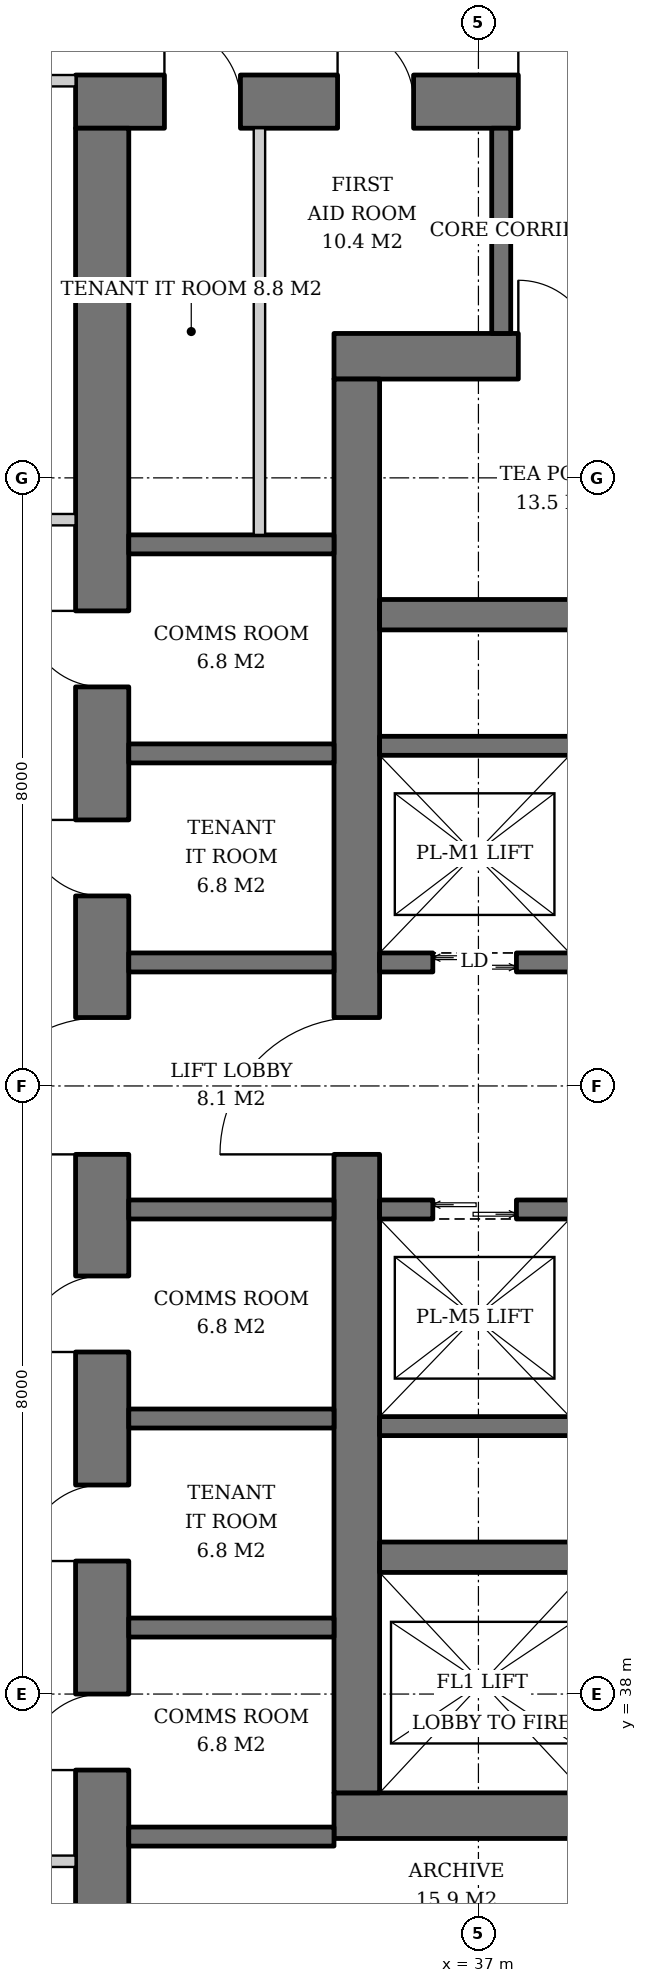
"""IFC4 building model, lengths in metres.
Left out: names, types, materials, properties, quantities, classifications, styles, units other than length and angle.
Written with IfcOpenShell. Run it as: python <this file> out.ifc"""

import sys

from ifc_helpers import new_model, si_unit, direction, frame, frame_2d, origin, place, context, subcontext, project, spatial, rectangle, extrude, element, fill, save


model = new_model("IFC4")
c1 = context("Model", 3, precision=1e-05, world=origin(), true_north=direction((0.0, 1.0)))
c2 = subcontext(c1, "Body", "Model", "MODEL_VIEW")
j1 = project(units=[si_unit("LENGTHUNIT", "METRE"), si_unit("PLANEANGLEUNIT", "RADIAN")], contexts=[c1])
p1 = place(None, origin())
s1 = spatial("IfcSite", under=j1, at=p1, CompositionType="ELEMENT")
p2 = place(p1, origin())
s2 = spatial("IfcBuilding", under=s1, at=p2, CompositionType="ELEMENT")
p3 = place(p2, frame((0.0, 0.0, 100.8)))
s3 = spatial("IfcBuildingStorey", under=s2, at=p3, CompositionType="ELEMENT", Elevation=100.8)
p4 = place(p3, frame((35.1, 36.4, 0.0), z_axis=(0.0, 0.0, 1.0), x_axis=(1.0, 0.0, 0.0)))
e1 = element("IfcWall", 1, at=p4, inside=s3, PredefinedType="SHEAR", context=c2, shape_type="SweptSolid", body=[
    extrude(rectangle(XDim=19.8, YDim=0.6, at=frame_2d((9.9, 0.0))), origin(), (0.0, 0.0, 1.0), 3.8),
])
p5 = place(p4, frame((3.9, 0.0, 0.0)))
e2 = element("IfcOpeningElement", 2, at=p5, cuts=e1, PredefinedType="OPENING", context=c2, shape_type="SweptSolid", body=[
    extrude(rectangle(XDim=1.0, YDim=2.1, at=frame_2d((0.5, 1.05))), frame((0.0, 0.31, 0.0), z_axis=(0.0, -1.0, 0.0), x_axis=(1.0, 0.0, 0.0)), (0.0, 0.0, 1.0), 0.62),
])
p6 = place(p4, frame((15.35, 0.0, 0.0)))
e3 = element("IfcOpeningElement", 3, at=p6, cuts=e1, PredefinedType="OPENING", context=c2, shape_type="SweptSolid", body=[
    extrude(rectangle(XDim=1.0, YDim=2.1, at=frame_2d((0.5, 1.05))), frame((0.0, 0.31, 0.0), z_axis=(0.0, -1.0, 0.0), x_axis=(1.0, 0.0, 0.0)), (0.0, 0.0, 1.0), 0.62),
])
p7 = place(p3, frame((35.1, 55.6, 0.0), z_axis=(0.0, 0.0, 1.0), x_axis=(1.0, 0.0, 0.0)))
e4 = element("IfcWall", 4, at=p7, inside=s3, PredefinedType="SHEAR", context=c2, shape_type="SweptSolid", body=[
    extrude(rectangle(XDim=19.8, YDim=0.6, at=frame_2d((9.9, 0.0))), origin(), (0.0, 0.0, 1.0), 3.8),
])
p8 = place(p7, frame((14.54, 0.0, 0.0)))
e5 = element("IfcOpeningElement", 5, at=p8, cuts=e4, PredefinedType="OPENING", context=c2, shape_type="SweptSolid", body=[
    extrude(rectangle(XDim=1.0, YDim=2.1, at=frame_2d((0.5, 1.05))), frame((0.0, 0.31, 0.0), z_axis=(0.0, -1.0, 0.0), x_axis=(1.0, 0.0, 0.0)), (0.0, 0.0, 1.0), 0.62),
])
p9 = place(p7, frame((2.425, 0.0, 0.0)))
e6 = element("IfcOpeningElement", 6, at=p9, cuts=e4, PredefinedType="OPENING", context=c2, shape_type="SweptSolid", body=[
    extrude(rectangle(XDim=1.0, YDim=2.1, at=frame_2d((0.5, 1.05))), frame((0.0, 0.31, 0.0), z_axis=(0.0, -1.0, 0.0), x_axis=(1.0, 0.0, 0.0)), (0.0, 0.0, 1.0), 0.62),
])
p10 = place(p3, frame((35.4, 36.7, 0.0), z_axis=(0.0, 0.0, 1.0), x_axis=(0.0, 1.0, 0.0)))
e7 = element("IfcWall", 7, at=p10, inside=s3, PredefinedType="SHEAR", context=c2, shape_type="SweptSolid", body=[
    extrude(rectangle(XDim=18.6, YDim=0.6, at=frame_2d((9.3, 0.0))), origin(), (0.0, 0.0, 1.0), 3.8),
])
p11 = place(p10, frame((8.4, 0.0, 0.0)))
e8 = element("IfcOpeningElement", 8, at=p11, cuts=e7, PredefinedType="OPENING", context=c2, shape_type="SweptSolid", body=[
    extrude(rectangle(XDim=1.8, YDim=2.4, at=frame_2d((0.9, 1.2))), frame((0.0, 0.31, 0.0), z_axis=(0.0, -1.0, 0.0), x_axis=(1.0, 0.0, 0.0)), (0.0, 0.0, 1.0), 0.62),
])
p12 = place(p3, frame((31.7, 58.95, 0.0), z_axis=(0.0, 0.0, 1.0), x_axis=(1.0, 0.0, 0.0)))
e9 = element("IfcWall", 9, at=p12, inside=s3, PredefinedType="SHEAR", context=c2, shape_type="SweptSolid", body=[
    extrude(rectangle(XDim=26.6, YDim=0.7, at=frame_2d((13.3, 0.0))), origin(), (0.0, 0.0, 1.0), 3.8),
])
p13 = place(p12, frame((17.94, 0.0, 0.0)))
e10 = element("IfcOpeningElement", 10, at=p13, cuts=e9, PredefinedType="OPENING", context=c2, shape_type="SweptSolid", body=[
    extrude(rectangle(XDim=1.0, YDim=2.1, at=frame_2d((0.5, 1.05))), frame((0.0, 0.36, 0.0), z_axis=(0.0, -1.0, 0.0), x_axis=(1.0, 0.0, 0.0)), (0.0, 0.0, 1.0), 0.72),
])
p14 = place(p12, frame((5.825, 0.0, 0.0)))
e11 = element("IfcOpeningElement", 11, at=p14, cuts=e9, PredefinedType="OPENING", context=c2, shape_type="SweptSolid", body=[
    extrude(rectangle(XDim=1.0, YDim=2.1, at=frame_2d((0.5, 1.05))), frame((0.0, 0.36, 0.0), z_axis=(0.0, -1.0, 0.0), x_axis=(1.0, 0.0, 0.0)), (0.0, 0.0, 1.0), 0.72),
])
p15 = place(p12, frame((1.169, 0.0, 0.0)))
e12 = element("IfcOpeningElement", 12, at=p15, cuts=e9, PredefinedType="OPENING", context=c2, shape_type="SweptSolid", body=[
    extrude(rectangle(XDim=1.0, YDim=2.1, at=frame_2d((0.5, 1.05))), frame((0.0, 0.36, 0.0), z_axis=(0.0, -1.0, 0.0), x_axis=(1.0, 0.0, 0.0)), (0.0, 0.0, 1.0), 0.72),
])
p16 = place(p12, frame((3.447, 0.0, 0.0)))
e13 = element("IfcOpeningElement", 13, at=p16, cuts=e9, PredefinedType="OPENING", context=c2, shape_type="SweptSolid", body=[
    extrude(rectangle(XDim=1.0, YDim=2.1, at=frame_2d((0.5, 1.05))), frame((0.0, 0.36, 0.0), z_axis=(0.0, -1.0, 0.0), x_axis=(1.0, 0.0, 0.0)), (0.0, 0.0, 1.0), 0.72),
])
p17 = place(p12, frame((11.577, 0.0, 0.0)))
e14 = element("IfcOpeningElement", 14, at=p17, cuts=e9, PredefinedType="OPENING", context=c2, shape_type="SweptSolid", body=[
    extrude(rectangle(XDim=1.0, YDim=2.1, at=frame_2d((0.5, 1.05))), frame((0.0, 0.36, 0.0), z_axis=(0.0, -1.0, 0.0), x_axis=(1.0, 0.0, 0.0)), (0.0, 0.0, 1.0), 0.72),
])
p18 = place(p12, frame((20.9, 0.0, 0.0)))
e15 = element("IfcOpeningElement", 15, at=p18, cuts=e9, PredefinedType="OPENING", context=c2, shape_type="SweptSolid", body=[
    extrude(rectangle(XDim=1.0, YDim=2.1, at=frame_2d((0.5, 1.05))), frame((0.0, 0.36, 0.0), z_axis=(0.0, -1.0, 0.0), x_axis=(1.0, 0.0, 0.0)), (0.0, 0.0, 1.0), 0.72),
])
p19 = place(p12, frame((23.75, 0.0, 0.0)))
e16 = element("IfcOpeningElement", 16, at=p19, cuts=e9, PredefinedType="OPENING", context=c2, shape_type="SweptSolid", body=[
    extrude(rectangle(XDim=1.0, YDim=2.1, at=frame_2d((0.5, 1.05))), frame((0.0, 0.36, 0.0), z_axis=(0.0, -1.0, 0.0), x_axis=(1.0, 0.0, 0.0)), (0.0, 0.0, 1.0), 0.72),
])
p20 = place(p3, frame((32.05, 33.4, 0.0), z_axis=(0.0, 0.0, 1.0), x_axis=(0.0, 1.0, 0.0)))
e17 = element("IfcWall", 17, at=p20, inside=s3, PredefinedType="SHEAR", context=c2, shape_type="SweptSolid", body=[
    extrude(rectangle(XDim=25.2, YDim=0.7, at=frame_2d((12.6, 0.0))), origin(), (0.0, 0.0, 1.0), 3.8),
])
p21 = place(p20, frame((11.7, 0.0, 0.0)))
e18 = element("IfcOpeningElement", 18, at=p21, cuts=e17, PredefinedType="OPENING", context=c2, shape_type="SweptSolid", body=[
    extrude(rectangle(XDim=1.8, YDim=2.4, at=frame_2d((0.9, 1.2))), frame((0.0, 0.36, 0.0), z_axis=(0.0, -1.0, 0.0), x_axis=(1.0, 0.0, 0.0)), (0.0, 0.0, 1.0), 0.72),
])
p22 = place(p20, frame((3.6, 0.0, 0.0)))
e19 = element("IfcOpeningElement", 19, at=p22, cuts=e17, PredefinedType="OPENING", context=c2, shape_type="SweptSolid", body=[
    extrude(rectangle(XDim=1.0, YDim=2.1, at=frame_2d((0.5, 1.05))), frame((0.0, 0.36, 0.0), z_axis=(0.0, -1.0, 0.0), x_axis=(1.0, 0.0, 0.0)), (0.0, 0.0, 1.0), 0.72),
])
p23 = place(p20, frame((6.35, 0.0, 0.0)))
e20 = element("IfcOpeningElement", 20, at=p23, cuts=e17, PredefinedType="OPENING", context=c2, shape_type="SweptSolid", body=[
    extrude(rectangle(XDim=1.0, YDim=2.1, at=frame_2d((0.5, 1.05))), frame((0.0, 0.36, 0.0), z_axis=(0.0, -1.0, 0.0), x_axis=(1.0, 0.0, 0.0)), (0.0, 0.0, 1.0), 0.72),
])
p24 = place(p20, frame((9.1, 0.0, 0.0)))
e21 = element("IfcOpeningElement", 21, at=p24, cuts=e17, PredefinedType="OPENING", context=c2, shape_type="SweptSolid", body=[
    extrude(rectangle(XDim=1.0, YDim=2.1, at=frame_2d((0.5, 1.05))), frame((0.0, 0.36, 0.0), z_axis=(0.0, -1.0, 0.0), x_axis=(1.0, 0.0, 0.0)), (0.0, 0.0, 1.0), 0.72),
])
p25 = place(p20, frame((15.1, 0.0, 0.0)))
e22 = element("IfcOpeningElement", 22, at=p25, cuts=e17, PredefinedType="OPENING", context=c2, shape_type="SweptSolid", body=[
    extrude(rectangle(XDim=1.0, YDim=2.1, at=frame_2d((0.5, 1.05))), frame((0.0, 0.36, 0.0), z_axis=(0.0, -1.0, 0.0), x_axis=(1.0, 0.0, 0.0)), (0.0, 0.0, 1.0), 0.72),
])
p26 = place(p20, frame((17.85, 0.0, 0.0)))
e23 = element("IfcOpeningElement", 23, at=p26, cuts=e17, PredefinedType="OPENING", context=c2, shape_type="SweptSolid", body=[
    extrude(rectangle(XDim=1.0, YDim=2.1, at=frame_2d((0.5, 1.05))), frame((0.0, 0.36, 0.0), z_axis=(0.0, -1.0, 0.0), x_axis=(1.0, 0.0, 0.0)), (0.0, 0.0, 1.0), 0.72),
])
for number, where, z_axis, x_axis in (
    (24, (35.7, 39.8, 0.0), (0.0, 0.0, 1.0), (1.0, 0.0, 0.0)),
    (25, (35.7, 52.2, 0.0), (0.0, 0.0, 1.0), (1.0, 0.0, 0.0)),
):
    element("IfcWall", number, at=place(p3, frame(where, z_axis=z_axis, x_axis=x_axis)), inside=s3, PredefinedType="SHEAR", context=c2, shape_type="SweptSolid", body=[
        extrude(rectangle(XDim=18.6, YDim=0.4, at=frame_2d((9.3, 0.0))), origin(), (0.0, 0.0, 1.0), 3.8),
    ])
p27 = place(p3, frame((35.7, 50.475, 0.0), z_axis=(0.0, 0.0, 1.0), x_axis=(1.0, 0.0, 0.0)))
e26 = element("IfcWall", 26, at=p27, inside=s3, PredefinedType="SHEAR", context=c2, shape_type="SweptSolid", body=[
    extrude(rectangle(XDim=11.0, YDim=0.25, at=frame_2d((5.5, 0.0))), origin(), (0.0, 0.0, 1.0), 3.8),
])
p28 = place(p3, frame((35.7, 47.625, 0.0), z_axis=(0.0, 0.0, 1.0), x_axis=(1.0, 0.0, 0.0)))
e27 = element("IfcWall", 27, at=p28, inside=s3, PredefinedType="SHEAR", context=c2, shape_type="SweptSolid", body=[
    extrude(rectangle(XDim=12.83, YDim=0.25, at=frame_2d((6.415, 0.0))), origin(), (0.0, 0.0, 1.0), 3.8),
])
p29 = place(p28, frame((0.7, 0.0, 0.0)))
e28 = element("IfcOpeningElement", 28, at=p29, cuts=e27, PredefinedType="OPENING", context=c2, shape_type="SweptSolid", body=[
    extrude(rectangle(XDim=1.1, YDim=2.2, at=frame_2d((0.55, 1.1))), frame((0.0, 0.135, 0.0), z_axis=(0.0, -1.0, 0.0), x_axis=(1.0, 0.0, 0.0)), (0.0, 0.0, 1.0), 0.27),
])
p30 = place(p28, frame((3.45, 0.0, 0.0)))
e29 = element("IfcOpeningElement", 29, at=p30, cuts=e27, PredefinedType="OPENING", context=c2, shape_type="SweptSolid", body=[
    extrude(rectangle(XDim=1.1, YDim=2.2, at=frame_2d((0.55, 1.1))), frame((0.0, 0.135, 0.0), z_axis=(0.0, -1.0, 0.0), x_axis=(1.0, 0.0, 0.0)), (0.0, 0.0, 1.0), 0.27),
])
p31 = place(p28, frame((6.2, 0.0, 0.0)))
e30 = element("IfcOpeningElement", 30, at=p31, cuts=e27, PredefinedType="OPENING", context=c2, shape_type="SweptSolid", body=[
    extrude(rectangle(XDim=1.1, YDim=2.2, at=frame_2d((0.55, 1.1))), frame((0.0, 0.135, 0.0), z_axis=(0.0, -1.0, 0.0), x_axis=(1.0, 0.0, 0.0)), (0.0, 0.0, 1.0), 0.27),
])
p32 = place(p28, frame((8.95, 0.0, 0.0)))
e31 = element("IfcOpeningElement", 31, at=p32, cuts=e27, PredefinedType="OPENING", context=c2, shape_type="SweptSolid", body=[
    extrude(rectangle(XDim=1.1, YDim=2.2, at=frame_2d((0.55, 1.1))), frame((0.0, 0.135, 0.0), z_axis=(0.0, -1.0, 0.0), x_axis=(1.0, 0.0, 0.0)), (0.0, 0.0, 1.0), 0.27),
])
p33 = place(p28, frame((11.515, 0.0, 0.0)))
e32 = element("IfcOpeningElement", 32, at=p33, cuts=e27, PredefinedType="OPENING", context=c2, shape_type="SweptSolid", body=[
    extrude(rectangle(XDim=0.8, YDim=2.0, at=frame_2d((0.4, 1.0))), frame((0.0, 0.135, 0.0), z_axis=(0.0, -1.0, 0.0), x_axis=(1.0, 0.0, 0.0)), (0.0, 0.0, 1.0), 0.27),
])
p34 = place(p3, frame((35.7, 41.525, 0.0), z_axis=(0.0, 0.0, 1.0), x_axis=(1.0, 0.0, 0.0)))
e33 = element("IfcWall", 33, at=p34, inside=s3, PredefinedType="SHEAR", context=c2, shape_type="SweptSolid", body=[
    extrude(rectangle(XDim=11.0, YDim=0.25, at=frame_2d((5.5, 0.0))), origin(), (0.0, 0.0, 1.0), 3.8),
])
p35 = place(p3, frame((35.7, 44.375, 0.0), z_axis=(0.0, 0.0, 1.0), x_axis=(1.0, 0.0, 0.0)))
e34 = element("IfcWall", 34, at=p35, inside=s3, PredefinedType="SHEAR", context=c2, shape_type="SweptSolid", body=[
    extrude(rectangle(XDim=12.83, YDim=0.25, at=frame_2d((6.415, 0.0))), origin(), (0.0, 0.0, 1.0), 3.8),
])
p36 = place(p35, frame((0.7, 0.0, 0.0)))
e35 = element("IfcOpeningElement", 35, at=p36, cuts=e34, PredefinedType="OPENING", context=c2, shape_type="SweptSolid", body=[
    extrude(rectangle(XDim=1.1, YDim=2.2, at=frame_2d((0.55, 1.1))), frame((0.0, 0.135, 0.0), z_axis=(0.0, -1.0, 0.0), x_axis=(1.0, 0.0, 0.0)), (0.0, 0.0, 1.0), 0.27),
])
p37 = place(p35, frame((3.45, 0.0, 0.0)))
e36 = element("IfcOpeningElement", 36, at=p37, cuts=e34, PredefinedType="OPENING", context=c2, shape_type="SweptSolid", body=[
    extrude(rectangle(XDim=1.1, YDim=2.2, at=frame_2d((0.55, 1.1))), frame((0.0, 0.135, 0.0), z_axis=(0.0, -1.0, 0.0), x_axis=(1.0, 0.0, 0.0)), (0.0, 0.0, 1.0), 0.27),
])
p38 = place(p35, frame((6.2, 0.0, 0.0)))
e37 = element("IfcOpeningElement", 37, at=p38, cuts=e34, PredefinedType="OPENING", context=c2, shape_type="SweptSolid", body=[
    extrude(rectangle(XDim=1.1, YDim=2.2, at=frame_2d((0.55, 1.1))), frame((0.0, 0.135, 0.0), z_axis=(0.0, -1.0, 0.0), x_axis=(1.0, 0.0, 0.0)), (0.0, 0.0, 1.0), 0.27),
])
p39 = place(p35, frame((8.95, 0.0, 0.0)))
e38 = element("IfcOpeningElement", 38, at=p39, cuts=e34, PredefinedType="OPENING", context=c2, shape_type="SweptSolid", body=[
    extrude(rectangle(XDim=1.1, YDim=2.2, at=frame_2d((0.55, 1.1))), frame((0.0, 0.135, 0.0), z_axis=(0.0, -1.0, 0.0), x_axis=(1.0, 0.0, 0.0)), (0.0, 0.0, 1.0), 0.27),
])
p40 = place(p35, frame((11.515, 0.0, 0.0)))
e39 = element("IfcOpeningElement", 39, at=p40, cuts=e34, PredefinedType="OPENING", context=c2, shape_type="SweptSolid", body=[
    extrude(rectangle(XDim=0.8, YDim=2.0, at=frame_2d((0.4, 1.0))), frame((0.0, 0.135, 0.0), z_axis=(0.0, -1.0, 0.0), x_axis=(1.0, 0.0, 0.0)), (0.0, 0.0, 1.0), 0.27),
])
for number, where, z_axis, x_axis in (
    (40, (32.4, 36.125, 0.0), (0.0, 0.0, 1.0), (1.0, 0.0, 0.0)),
    (41, (32.4, 38.875, 0.0), (0.0, 0.0, 1.0), (1.0, 0.0, 0.0)),
    (42, (32.4, 41.625, 0.0), (0.0, 0.0, 1.0), (1.0, 0.0, 0.0)),
    (43, (32.4, 44.375, 0.0), (0.0, 0.0, 1.0), (1.0, 0.0, 0.0)),
    (44, (32.4, 47.625, 0.0), (0.0, 0.0, 1.0), (1.0, 0.0, 0.0)),
    (45, (32.4, 50.375, 0.0), (0.0, 0.0, 1.0), (1.0, 0.0, 0.0)),
    (46, (32.4, 53.125, 0.0), (0.0, 0.0, 1.0), (1.0, 0.0, 0.0)),
):
    element("IfcWall", number, at=place(p3, frame(where, z_axis=z_axis, x_axis=x_axis)), inside=s3, PredefinedType="SHEAR", context=c2, shape_type="SweptSolid", body=[
        extrude(rectangle(XDim=2.7, YDim=0.25, at=frame_2d((1.35, 0.0))), origin(), (0.0, 0.0, 1.0), 3.8),
    ])
p41 = place(p3, frame((37.3, 55.9, 0.0), z_axis=(0.0, 0.0, 1.0), x_axis=(0.0, 1.0, 0.0)))
e47 = element("IfcWall", 47, at=p41, inside=s3, PredefinedType="SOLIDWALL", context=c2, shape_type="SweptSolid", body=[
    extrude(rectangle(XDim=2.7, YDim=0.25, at=frame_2d((1.35, 0.0))), origin(), (0.0, 0.0, 1.0), 3.62),
])
p42 = place(p3, frame((34.119, 53.25, 0.0), z_axis=(0.0, 0.0, 1.0), x_axis=(0.0, 1.0, 0.0)))
e48 = element("IfcWall", 48, at=p42, inside=s3, PredefinedType="SOLIDWALL", context=c2, shape_type="SweptSolid", body=[
    extrude(rectangle(XDim=5.35, YDim=0.15, at=frame_2d((2.675, 0.0))), origin(), (0.0, 0.0, 1.0), 3.62),
])
for number, where, z_axis, x_axis in (
    (49, (31.7, 59.225, 0.0), (0.0, 0.0, 1.0), (-1.0, 0.0, 0.0)),
    (50, (31.7, 53.45, 0.0), (0.0, 0.0, 1.0), (-1.0, 0.0, 0.0)),
    (51, (31.7, 35.8, 0.0), (0.0, 0.0, 1.0), (-1.0, 0.0, 0.0)),
):
    element("IfcWall", number, at=place(p3, frame(where, z_axis=z_axis, x_axis=x_axis)), inside=s3, PredefinedType="PARTITIONING", context=c2, shape_type="SweptSolid", body=[
        extrude(rectangle(XDim=2.925, YDim=0.15, at=frame_2d((1.462, 0.0))), origin(), (0.0, 0.0, 1.0), 3.62),
    ])
p43 = place(p29, origin())
e52 = element("IfcDoor", 52, at=p43, inside=s3, OperationType="DOUBLE_DOOR_SLIDING", PredefinedType="DOOR", context=c2, shape_type="SweptSolid", body=[
    extrude(rectangle(XDim=1.1, YDim=2.2, at=frame_2d((0.55, 1.1))), frame((0.0, 0.025, 0.0), z_axis=(0.0, -1.0, 0.0), x_axis=(1.0, 0.0, 0.0)), (0.0, 0.0, 1.0), 0.05),
])
fill(e28, e52)
p44 = place(p36, origin())
e53 = element("IfcDoor", 53, at=p44, inside=s3, OperationType="DOUBLE_DOOR_SLIDING", PredefinedType="DOOR", context=c2, shape_type="SweptSolid", body=[
    extrude(rectangle(XDim=1.1, YDim=2.2, at=frame_2d((0.55, 1.1))), frame((0.0, 0.025, 0.0), z_axis=(0.0, -1.0, 0.0), x_axis=(1.0, 0.0, 0.0)), (0.0, 0.0, 1.0), 0.05),
])
fill(e35, e53)
p45 = place(p11, origin())
e54 = element("IfcDoor", 54, at=p45, inside=s3, OperationType="DOUBLE_DOOR_SINGLE_SWING", PredefinedType="DOOR", context=c2, shape_type="SweptSolid", body=[
    extrude(rectangle(XDim=1.8, YDim=2.4, at=frame_2d((0.9, 1.2))), frame((0.0, 0.025, 0.0), z_axis=(0.0, -1.0, 0.0), x_axis=(1.0, 0.0, 0.0)), (0.0, 0.0, 1.0), 0.05),
])
fill(e8, e54)
p46 = place(p21, origin())
e55 = element("IfcDoor", 55, at=p46, inside=s3, OperationType="DOUBLE_DOOR_SINGLE_SWING", PredefinedType="DOOR", context=c2, shape_type="SweptSolid", body=[
    extrude(rectangle(XDim=1.8, YDim=2.4, at=frame_2d((0.9, 1.2))), frame((0.0, 0.025, 0.0), z_axis=(0.0, -1.0, 0.0), x_axis=(1.0, 0.0, 0.0)), (0.0, 0.0, 1.0), 0.05),
])
fill(e18, e55)
p47 = place(p14, origin())
e56 = element("IfcDoor", 56, at=p47, inside=s3, OperationType="SINGLE_SWING_LEFT", PredefinedType="DOOR", context=c2, shape_type="SweptSolid", body=[
    extrude(rectangle(XDim=1.0, YDim=2.1, at=frame_2d((0.5, 1.05))), frame((0.0, 0.025, 0.0), z_axis=(0.0, -1.0, 0.0), x_axis=(1.0, 0.0, 0.0)), (0.0, 0.0, 1.0), 0.05),
])
fill(e11, e56)
p48 = place(p9, origin())
e57 = element("IfcDoor", 57, at=p48, inside=s3, OperationType="SINGLE_SWING_LEFT", PredefinedType="DOOR", context=c2, shape_type="SweptSolid", body=[
    extrude(rectangle(XDim=1.0, YDim=2.1, at=frame_2d((0.5, 1.05))), frame((0.0, -0.24, 0.0), z_axis=(0.0, -1.0, 0.0), x_axis=(1.0, 0.0, 0.0)), (0.0, 0.0, 1.0), 0.05),
])
fill(e6, e57)
p49 = place(p22, origin())
e58 = element("IfcDoor", 58, at=p49, inside=s3, OperationType="SINGLE_SWING_LEFT", PredefinedType="DOOR", context=c2, shape_type="SweptSolid", body=[
    extrude(rectangle(XDim=1.0, YDim=2.1, at=frame_2d((0.5, 1.05))), frame((0.0, -0.29, 0.0), z_axis=(0.0, -1.0, 0.0), x_axis=(1.0, 0.0, 0.0)), (0.0, 0.0, 1.0), 0.05),
])
fill(e19, e58)
p50 = place(p23, origin())
e59 = element("IfcDoor", 59, at=p50, inside=s3, OperationType="SINGLE_SWING_LEFT", PredefinedType="DOOR", context=c2, shape_type="SweptSolid", body=[
    extrude(rectangle(XDim=1.0, YDim=2.1, at=frame_2d((0.5, 1.05))), frame((0.0, -0.29, 0.0), z_axis=(0.0, -1.0, 0.0), x_axis=(1.0, 0.0, 0.0)), (0.0, 0.0, 1.0), 0.05),
])
fill(e20, e59)
p51 = place(p24, origin())
e60 = element("IfcDoor", 60, at=p51, inside=s3, OperationType="SINGLE_SWING_LEFT", PredefinedType="DOOR", context=c2, shape_type="SweptSolid", body=[
    extrude(rectangle(XDim=1.0, YDim=2.1, at=frame_2d((0.5, 1.05))), frame((0.0, -0.29, 0.0), z_axis=(0.0, -1.0, 0.0), x_axis=(1.0, 0.0, 0.0)), (0.0, 0.0, 1.0), 0.05),
])
fill(e21, e60)
p52 = place(p25, origin())
e61 = element("IfcDoor", 61, at=p52, inside=s3, OperationType="SINGLE_SWING_RIGHT", PredefinedType="DOOR", context=c2, shape_type="SweptSolid", body=[
    extrude(rectangle(XDim=1.0, YDim=2.1, at=frame_2d((0.5, 1.05))), frame((0.0, -0.29, 0.0), z_axis=(0.0, -1.0, 0.0), x_axis=(1.0, 0.0, 0.0)), (0.0, 0.0, 1.0), 0.05),
])
fill(e22, e61)
p53 = place(p26, origin())
e62 = element("IfcDoor", 62, at=p53, inside=s3, OperationType="SINGLE_SWING_RIGHT", PredefinedType="DOOR", context=c2, shape_type="SweptSolid", body=[
    extrude(rectangle(XDim=1.0, YDim=2.1, at=frame_2d((0.5, 1.05))), frame((0.0, -0.29, 0.0), z_axis=(0.0, -1.0, 0.0), x_axis=(1.0, 0.0, 0.0)), (0.0, 0.0, 1.0), 0.05),
])
fill(e23, e62)
p54 = place(p15, origin())
e63 = element("IfcDoor", 63, at=p54, inside=s3, OperationType="SINGLE_SWING_LEFT", PredefinedType="DOOR", context=c2, shape_type="SweptSolid", body=[
    extrude(rectangle(XDim=1.0, YDim=2.1, at=frame_2d((0.5, 1.05))), frame((0.0, -0.29, 0.0), z_axis=(0.0, -1.0, 0.0), x_axis=(1.0, 0.0, 0.0)), (0.0, 0.0, 1.0), 0.05),
])
fill(e12, e63)
p55 = place(p16, origin())
e64 = element("IfcDoor", 64, at=p55, inside=s3, OperationType="SINGLE_SWING_LEFT", PredefinedType="DOOR", context=c2, shape_type="SweptSolid", body=[
    extrude(rectangle(XDim=1.0, YDim=2.1, at=frame_2d((0.5, 1.05))), frame((0.0, -0.29, 0.0), z_axis=(0.0, -1.0, 0.0), x_axis=(1.0, 0.0, 0.0)), (0.0, 0.0, 1.0), 0.05),
])
fill(e13, e64)
save(model, sys.argv[1])
